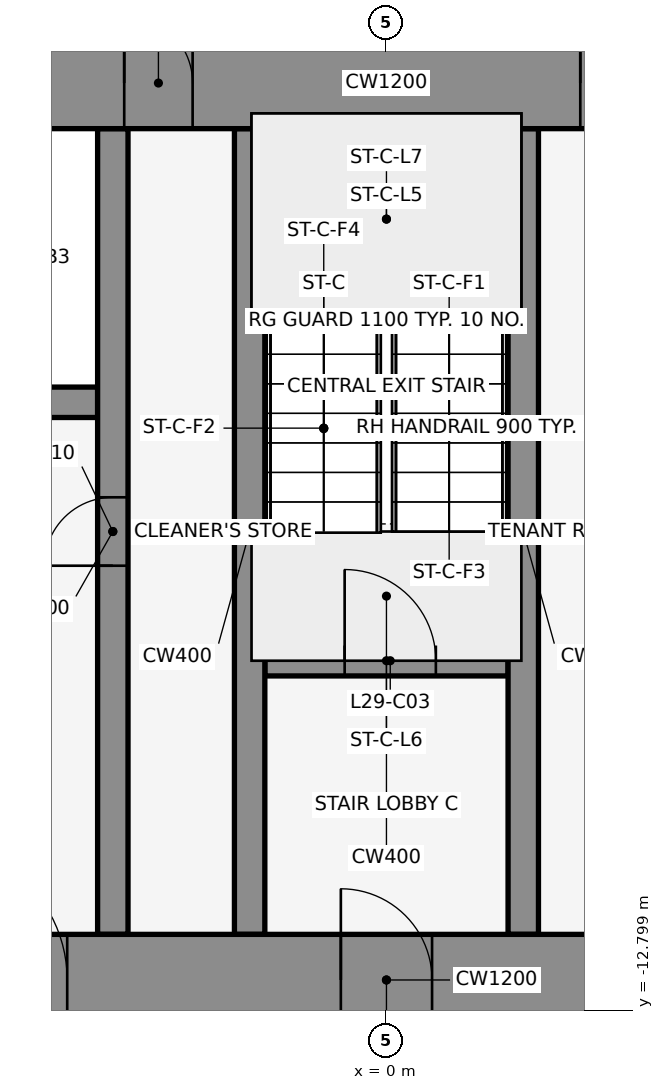
"""IFC4 building model, lengths in metres.
Left out: names, types, materials, properties, quantities, classifications, styles, units other than length and angle.
Written with IfcOpenShell. Run it as: python <this file> out.ifc"""

import sys

from ifc_helpers import new_model, si_unit, direction, frame, frame_2d, origin, place, context, subcontext, project, spatial, rectangle, extrude, element, fill, save


model = new_model("IFC4")
c1 = context("Model", 3, precision=1e-05, world=origin(), true_north=direction((0.0, 1.0)))
c2 = subcontext(c1, "Body", "Model", "MODEL_VIEW")
j1 = project(units=[si_unit("LENGTHUNIT", "METRE"), si_unit("PLANEANGLEUNIT", "RADIAN")], contexts=[c1])
p1 = place(None, origin())
s1 = spatial("IfcSite", under=j1, at=p1, CompositionType="ELEMENT")
p2 = place(p1, origin())
s2 = spatial("IfcBuilding", under=s1, at=p2, CompositionType="ELEMENT")
p3 = place(p2, frame((0.0, 0.0, 135.0)))
s3 = spatial("IfcBuildingStorey", under=s2, at=p3, CompositionType="ELEMENT", Elevation=135.0)
for number, where, z_axis, x_axis in (
    (1, (1.901, 1.08, 0.0), (0.0, 0.0, 1.0), (-0.84, -0.543, 0.0)),
    (2, (-0.068, -0.105, 0.0), (0.0, 0.0, 1.0), (-0.84, 0.543, 0.0)),
):
    element("IfcWall", number, at=place(p3, frame(where, z_axis=z_axis, x_axis=x_axis)), inside=s3, PredefinedType="STANDARD", context=c2, shape_type="SweptSolid", body=[
        extrude(rectangle(XDim=2.183, YDim=0.25, at=frame_2d((1.091, 0.0))), origin(), (0.0, 0.0, 1.0), 5.25),
    ])
p4 = place(p3, frame((-1.6, -8.2, 0.0), z_axis=(0.0, 0.0, 1.0), x_axis=(1.0, 0.0, 0.0)))
e3 = element("IfcWall", 3, at=p4, inside=s3, PredefinedType="SHEAR", context=c2, shape_type="SweptSolid", body=[
    extrude(rectangle(XDim=3.2, YDim=0.4, at=frame_2d((1.6, 0.0))), origin(), (0.0, 0.0, 1.0), 5.4),
])
p5 = place(p4, frame((1.05, 0.0, 0.0)))
e4 = element("IfcOpeningElement", 4, at=p5, cuts=e3, PredefinedType="OPENING", context=c2, shape_type="SweptSolid", body=[
    extrude(rectangle(XDim=1.2, YDim=2.1, at=frame_2d((0.6, 1.05))), frame((0.0, 0.212, 0.0), z_axis=(0.0, -1.0, 0.0), x_axis=(1.0, 0.0, 0.0)), (0.0, 0.0, 1.0), 0.424),
])
p6 = place(p3, frame((-17.4, -4.8, 0.0), z_axis=(0.0, 0.0, 1.0), x_axis=(1.0, 0.0, 0.0)))
e5 = element("IfcWall", 5, at=p6, inside=s3, PredefinedType="SHEAR", context=c2, shape_type="SweptSolid", body=[
    extrude(rectangle(XDim=13.6, YDim=0.4, at=frame_2d((6.8, 0.0))), origin(), (0.0, 0.0, 1.0), 5.4),
])
p7 = place(p6, frame((0.65, 0.0, 0.0)))
e6 = element("IfcOpeningElement", 6, at=p7, cuts=e5, PredefinedType="OPENING", context=c2, shape_type="SweptSolid", body=[
    extrude(rectangle(XDim=1.1, YDim=2.1, at=frame_2d((0.55, 1.05))), frame((0.0, 0.212, 0.0), z_axis=(0.0, -1.0, 0.0), x_axis=(1.0, 0.0, 0.0)), (0.0, 0.0, 1.0), 0.424),
])
p8 = place(p6, frame((2.95, 0.0, 0.0)))
e7 = element("IfcOpeningElement", 7, at=p8, cuts=e5, PredefinedType="OPENING", context=c2, shape_type="SweptSolid", body=[
    extrude(rectangle(XDim=1.1, YDim=2.1, at=frame_2d((0.55, 1.05))), frame((0.0, 0.212, 0.0), z_axis=(0.0, -1.0, 0.0), x_axis=(1.0, 0.0, 0.0)), (0.0, 0.0, 1.0), 0.424),
])
p9 = place(p6, frame((5.65, 0.0, 0.0)))
e8 = element("IfcOpeningElement", 8, at=p9, cuts=e5, PredefinedType="OPENING", context=c2, shape_type="SweptSolid", body=[
    extrude(rectangle(XDim=1.2, YDim=2.1, at=frame_2d((0.6, 1.05))), frame((0.0, 0.212, 0.0), z_axis=(0.0, -1.0, 0.0), x_axis=(1.0, 0.0, 0.0)), (0.0, 0.0, 1.0), 0.424),
])
p10 = place(p6, frame((8.65, 0.0, 0.0)))
e9 = element("IfcOpeningElement", 9, at=p10, cuts=e5, PredefinedType="OPENING", context=c2, shape_type="SweptSolid", body=[
    extrude(rectangle(XDim=1.2, YDim=2.1, at=frame_2d((0.6, 1.05))), frame((0.0, 0.212, 0.0), z_axis=(0.0, -1.0, 0.0), x_axis=(1.0, 0.0, 0.0)), (0.0, 0.0, 1.0), 0.424),
])
p11 = place(p6, frame((11.65, 0.0, 0.0)))
e10 = element("IfcOpeningElement", 10, at=p11, cuts=e5, PredefinedType="OPENING", context=c2, shape_type="SweptSolid", body=[
    extrude(rectangle(XDim=1.2, YDim=2.1, at=frame_2d((0.6, 1.05))), frame((0.0, 0.212, 0.0), z_axis=(0.0, -1.0, 0.0), x_axis=(1.0, 0.0, 0.0)), (0.0, 0.0, 1.0), 0.424),
])
p12 = place(p3, frame((-3.6, -11.8, 0.0), z_axis=(0.0, 0.0, 1.0), x_axis=(0.0, 1.0, 0.0)))
e11 = element("IfcWall", 11, at=p12, inside=s3, PredefinedType="SHEAR", context=c2, shape_type="SweptSolid", body=[
    extrude(rectangle(XDim=10.6, YDim=0.4, at=frame_2d((5.3, 0.0))), origin(), (0.0, 0.0, 1.0), 5.4),
])
p13 = place(p12, frame((4.85, 0.0, 0.0)))
e12 = element("IfcOpeningElement", 12, at=p13, cuts=e11, PredefinedType="OPENING", context=c2, shape_type="SweptSolid", body=[
    extrude(rectangle(XDim=0.9, YDim=2.1, at=frame_2d((0.45, 1.05))), frame((0.0, 0.212, 0.0), z_axis=(0.0, -1.0, 0.0), x_axis=(1.0, 0.0, 0.0)), (0.0, 0.0, 1.0), 0.424),
])
for number, where, z_axis, x_axis in (
    (13, (-1.8, -11.8, 0.0), (0.0, 0.0, 1.0), (0.0, 1.0, 0.0)),
    (14, (1.8, -11.8, 0.0), (0.0, 0.0, 1.0), (0.0, 1.0, 0.0)),
):
    element("IfcWall", number, at=place(p3, frame(where, z_axis=z_axis, x_axis=x_axis)), inside=s3, PredefinedType="SHEAR", context=c2, shape_type="SweptSolid", body=[
        extrude(rectangle(XDim=10.6, YDim=0.4, at=frame_2d((5.3, 0.0))), origin(), (0.0, 0.0, 1.0), 5.4),
    ])
p14 = place(p3, frame((-22.0, -0.6, 0.0), z_axis=(0.0, 0.0, 1.0), x_axis=(1.0, 0.0, 0.0)))
e15 = element("IfcWall", 15, at=p14, inside=s3, PredefinedType="SHEAR", context=c2, shape_type="SweptSolid", body=[
    extrude(rectangle(XDim=44.0, YDim=1.2, at=frame_2d((22.0, 0.0))), origin(), (0.0, 0.0, 1.0), 5.4),
])
p15 = place(p14, frame((18.55, 0.0, 0.0)))
e16 = element("IfcOpeningElement", 16, at=p15, cuts=e15, PredefinedType="OPENING", context=c2, shape_type="SweptSolid", body=[
    extrude(rectangle(XDim=0.9, YDim=2.1, at=frame_2d((0.45, 1.05))), frame((0.0, 0.612, 0.0), z_axis=(0.0, -1.0, 0.0), x_axis=(1.0, 0.0, 0.0)), (0.0, 0.0, 1.0), 1.224),
])
p16 = place(p14, frame((24.55, 0.0, 0.0)))
e17 = element("IfcOpeningElement", 17, at=p16, cuts=e15, PredefinedType="OPENING", context=c2, shape_type="SweptSolid", body=[
    extrude(rectangle(XDim=0.9, YDim=2.1, at=frame_2d((0.45, 1.05))), frame((0.0, 0.612, 0.0), z_axis=(0.0, -1.0, 0.0), x_axis=(1.0, 0.0, 0.0)), (0.0, 0.0, 1.0), 1.224),
])
p17 = place(p3, frame((-22.0, -12.4, 0.0), z_axis=(0.0, 0.0, 1.0), x_axis=(1.0, 0.0, 0.0)))
e18 = element("IfcWall", 18, at=p17, inside=s3, PredefinedType="SHEAR", context=c2, shape_type="SweptSolid", body=[
    extrude(rectangle(XDim=44.0, YDim=1.2, at=frame_2d((22.0, 0.0))), origin(), (0.0, 0.0, 1.0), 5.4),
])
p18 = place(p17, frame((2.2, 0.0, 0.0)))
e19 = element("IfcOpeningElement", 19, at=p18, cuts=e18, PredefinedType="OPENING", context=c2, shape_type="SweptSolid", body=[
    extrude(rectangle(XDim=1.2, YDim=2.1, at=frame_2d((0.6, 1.05))), frame((0.0, 0.612, 0.0), z_axis=(0.0, -1.0, 0.0), x_axis=(1.0, 0.0, 0.0)), (0.0, 0.0, 1.0), 1.224),
])
p19 = place(p17, frame((21.4, 0.0, 0.0)))
e20 = element("IfcOpeningElement", 20, at=p19, cuts=e18, PredefinedType="OPENING", context=c2, shape_type="SweptSolid", body=[
    extrude(rectangle(XDim=1.2, YDim=2.1, at=frame_2d((0.6, 1.05))), frame((0.0, 0.612, 0.0), z_axis=(0.0, -1.0, 0.0), x_axis=(1.0, 0.0, 0.0)), (0.0, 0.0, 1.0), 1.224),
])
p20 = place(p17, frame((40.6, 0.0, 0.0)))
e21 = element("IfcOpeningElement", 21, at=p20, cuts=e18, PredefinedType="OPENING", context=c2, shape_type="SweptSolid", body=[
    extrude(rectangle(XDim=1.2, YDim=2.1, at=frame_2d((0.6, 1.05))), frame((0.0, 0.612, 0.0), z_axis=(0.0, -1.0, 0.0), x_axis=(1.0, 0.0, 0.0)), (0.0, 0.0, 1.0), 1.224),
])
p21 = place(p17, frame((16.0, 0.0, 0.0)))
e22 = element("IfcOpeningElement", 22, at=p21, cuts=e18, PredefinedType="OPENING", context=c2, shape_type="SweptSolid", body=[
    extrude(rectangle(XDim=1.8, YDim=2.1, at=frame_2d((0.9, 1.05))), frame((0.0, 0.612, 0.0), z_axis=(0.0, -1.0, 0.0), x_axis=(1.0, 0.0, 0.0)), (0.0, 0.0, 1.0), 1.224),
])
p22 = place(p17, frame((6.3, 0.0, 0.0)))
e23 = element("IfcOpeningElement", 23, at=p22, cuts=e18, PredefinedType="OPENING", context=c2, shape_type="SweptSolid", body=[
    extrude(rectangle(XDim=1.2, YDim=2.1, at=frame_2d((0.6, 1.05))), frame((0.0, 0.612, 0.0), z_axis=(0.0, -1.0, 0.0), x_axis=(1.0, 0.0, 0.0)), (0.0, 0.0, 1.0), 1.224),
])
p23 = place(p17, frame((26.2, 0.0, 0.0)))
e24 = element("IfcOpeningElement", 24, at=p23, cuts=e18, PredefinedType="OPENING", context=c2, shape_type="SweptSolid", body=[
    extrude(rectangle(XDim=1.8, YDim=2.1, at=frame_2d((0.9, 1.05))), frame((0.0, 0.612, 0.0), z_axis=(0.0, -1.0, 0.0), x_axis=(1.0, 0.0, 0.0)), (0.0, 0.0, 1.0), 1.224),
])
p24 = place(p17, frame((36.5, 0.0, 0.0)))
e25 = element("IfcOpeningElement", 25, at=p24, cuts=e18, PredefinedType="OPENING", context=c2, shape_type="SweptSolid", body=[
    extrude(rectangle(XDim=1.2, YDim=2.1, at=frame_2d((0.6, 1.05))), frame((0.0, 0.612, 0.0), z_axis=(0.0, -1.0, 0.0), x_axis=(1.0, 0.0, 0.0)), (0.0, 0.0, 1.0), 1.224),
])
p25 = place(p5, origin())
e26 = element("IfcDoor", 26, at=p25, inside=s3, OperationType="SINGLE_SWING_LEFT", PredefinedType="DOOR", context=c2, shape_type="SweptSolid", body=[
    extrude(rectangle(XDim=1.2, YDim=2.1, at=frame_2d((0.6, 1.05))), frame((0.0, 0.025, 0.0), z_axis=(0.0, -1.0, 0.0), x_axis=(1.0, 0.0, 0.0)), (0.0, 0.0, 1.0), 0.05),
])
fill(e4, e26)
p26 = place(p13, frame((0.9, 0.0, 0.0), z_axis=(0.0, 0.0, 1.0), x_axis=(-1.0, 0.0, 0.0)))
e27 = element("IfcDoor", 27, at=p26, inside=s3, OperationType="SINGLE_SWING_LEFT", PredefinedType="DOOR", context=c2, shape_type="SweptSolid", body=[
    extrude(rectangle(XDim=0.9, YDim=2.1, at=frame_2d((0.45, 1.05))), frame((0.0, 0.025, 0.0), z_axis=(0.0, -1.0, 0.0), x_axis=(1.0, 0.0, 0.0)), (0.0, 0.0, 1.0), 0.05),
])
fill(e12, e27)
p27 = place(p15, origin())
e28 = element("IfcDoor", 28, at=p27, inside=s3, OperationType="SINGLE_SWING_LEFT", PredefinedType="DOOR", context=c2, shape_type="SweptSolid", body=[
    extrude(rectangle(XDim=0.9, YDim=2.1, at=frame_2d((0.45, 1.05))), frame((0.0, 0.025, 0.0), z_axis=(0.0, -1.0, 0.0), x_axis=(1.0, 0.0, 0.0)), (0.0, 0.0, 1.0), 0.05),
])
fill(e16, e28)
p28 = place(p16, origin())
e29 = element("IfcDoor", 29, at=p28, inside=s3, OperationType="SINGLE_SWING_LEFT", PredefinedType="DOOR", context=c2, shape_type="SweptSolid", body=[
    extrude(rectangle(XDim=0.9, YDim=2.1, at=frame_2d((0.45, 1.05))), frame((0.0, 0.025, 0.0), z_axis=(0.0, -1.0, 0.0), x_axis=(1.0, 0.0, 0.0)), (0.0, 0.0, 1.0), 0.05),
])
fill(e17, e29)
p29 = place(p19, frame((1.2, 0.0, 0.0), z_axis=(0.0, 0.0, 1.0), x_axis=(-1.0, 0.0, 0.0)))
e30 = element("IfcDoor", 30, at=p29, inside=s3, OperationType="SINGLE_SWING_RIGHT", PredefinedType="DOOR", context=c2, shape_type="SweptSolid", body=[
    extrude(rectangle(XDim=1.2, YDim=2.1, at=frame_2d((0.6, 1.05))), frame((0.0, 0.025, 0.0), z_axis=(0.0, -1.0, 0.0), x_axis=(1.0, 0.0, 0.0)), (0.0, 0.0, 1.0), 0.05),
])
fill(e20, e30)
p30 = place(p21, origin())
e31 = element("IfcDoor", 31, at=p30, inside=s3, OperationType="SINGLE_SWING_LEFT", PredefinedType="DOOR", context=c2, shape_type="SweptSolid", body=[
    extrude(rectangle(XDim=1.8, YDim=2.1, at=frame_2d((0.9, 1.05))), frame((0.0, 0.025, 0.0), z_axis=(0.0, -1.0, 0.0), x_axis=(1.0, 0.0, 0.0)), (0.0, 0.0, 1.0), 0.05),
])
fill(e22, e31)
save(model, sys.argv[1])
